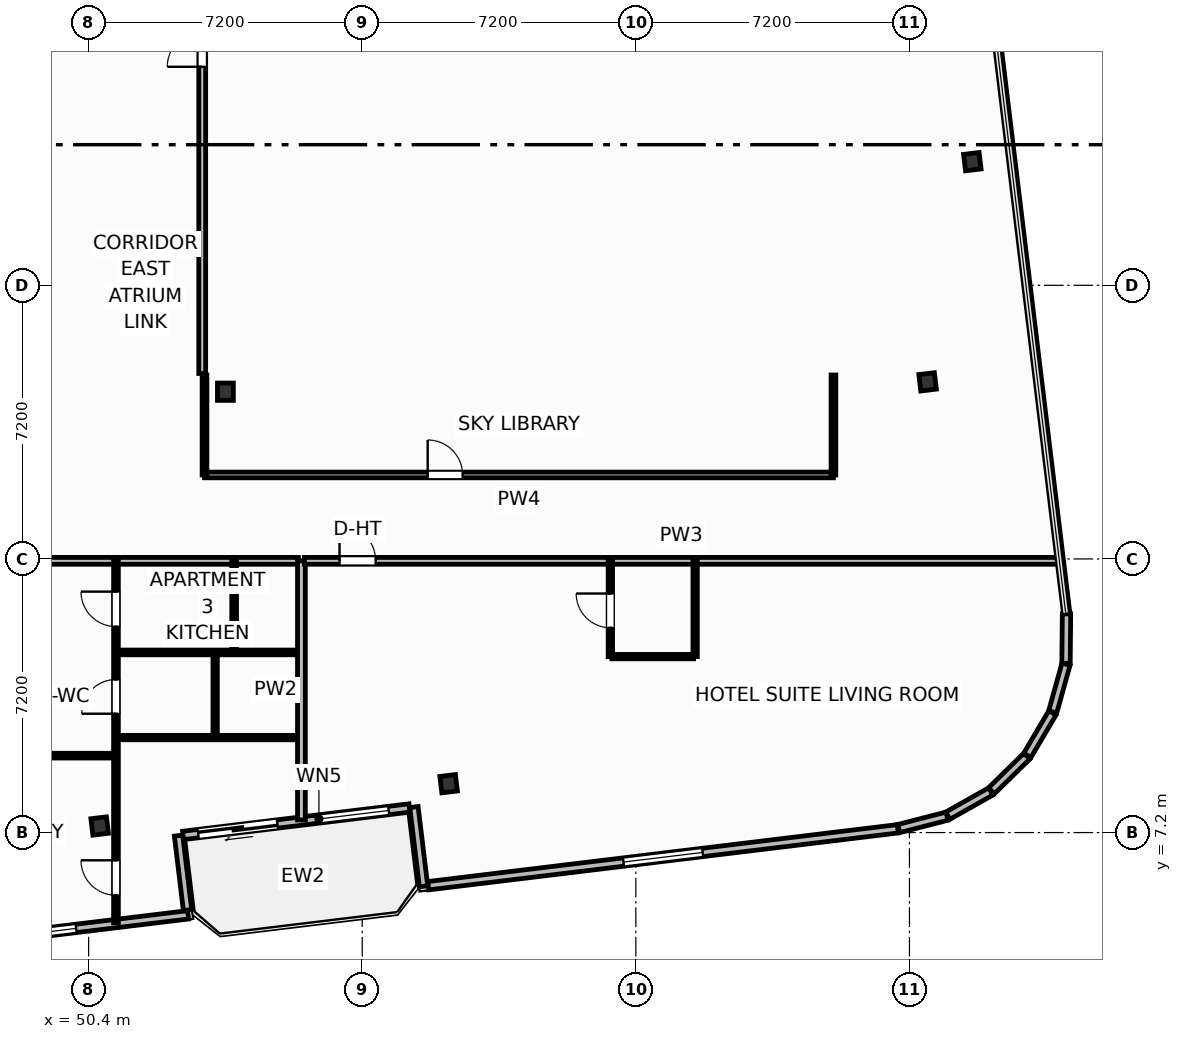
"""IFC4 building model, lengths in metres.
Left out: names, types, materials, properties, quantities, classifications, styles, units other than length and angle.
Written with IfcOpenShell. Run it as: python <this file> out.ifc"""

import sys

from ifc_helpers import new_model, si_unit, direction, frame, frame_2d, origin, origin_2d, place, context, subcontext, project, spatial, rectangle, i_section, extrude, element, fill, save


model = new_model("IFC4")
c1 = context("Model", 3, precision=1e-05, world=origin(), true_north=direction((0.0, 1.0)))
c2 = subcontext(c1, "Body", "Model", "MODEL_VIEW")
j1 = project(units=[si_unit("LENGTHUNIT", "METRE"), si_unit("PLANEANGLEUNIT", "RADIAN")], contexts=[c1])
p1 = place(None, origin())
s1 = spatial("IfcSite", under=j1, at=p1, CompositionType="ELEMENT")
p2 = place(p1, origin())
s2 = spatial("IfcBuilding", under=s1, at=p2, CompositionType="ELEMENT")
p3 = place(p2, frame((0.0, 0.0, 185.7)))
s3 = spatial("IfcBuildingStorey", under=s2, at=p3, CompositionType="ELEMENT", Elevation=185.7)
p4 = place(p3, frame((54.0, 18.8, 0.0), z_axis=(0.0, 0.0, 1.0), x_axis=(1.0, 0.0, 0.0)))
e1 = element("IfcColumn", 1, at=p4, inside=s3, PredefinedType="COLUMN", context=c2, shape_type="SweptSolid", body=[
    extrude(i_section(OverallWidth=0.418, OverallDepth=0.455, WebThickness=0.042, FlangeThickness=0.068, FilletRadius=0.025, at=origin_2d()), origin(), (0.0, 0.0, 1.0), 3.7),
])
for number, where, z_axis, x_axis in (
    (2, (50.691, 7.373, 0.0), (0.0, 0.0, 1.0), (0.993, 0.12, 0.0)),
    (3, (59.874, 8.486, 0.0), (0.0, 0.0, 1.0), (0.993, 0.12, 0.0)),
    (4, (72.477, 19.059, 0.0), (0.0, 0.0, 1.0), (0.993, 0.12, 0.0)),
    (5, (73.654, 24.853, 0.0), (0.0, 0.0, 1.0), (0.993, 0.12, 0.0)),
):
    element("IfcColumn", number, at=place(p3, frame(where, z_axis=z_axis, x_axis=x_axis)), inside=s3, PredefinedType="COLUMN", context=c2, shape_type="SweptSolid", body=[
        extrude(i_section(OverallWidth=0.412, OverallDepth=0.435, WebThickness=0.036, FlangeThickness=0.057, FilletRadius=0.025, at=origin_2d()), origin(), (0.0, 0.0, 1.0), 3.7),
    ])
p5 = place(p3, frame((58.843, 7.847, 0.0), z_axis=(0.0, 0.0, 1.0), x_axis=(-0.992729951822, -0.120362962556, 0.0)))
e6 = element("IfcWall", 6, at=p5, inside=s3, PredefinedType="SOLIDWALL", context=c2, shape_type="SweptSolid", body=[
    extrude(rectangle(XDim=6.0, YDim=0.22, at=frame_2d((3.0, 0.0))), origin(), (0.0, 0.0, 1.0), 2.73),
])
p6 = place(p5, frame((3.5, 0.0, 0.0)))
e7 = element("IfcOpeningElement", 7, at=p6, cuts=e6, PredefinedType="OPENING", context=c2, shape_type="SweptSolid", body=[
    extrude(rectangle(XDim=2.1, YDim=2.3, at=frame_2d((1.05, 1.15))), frame((0.0, 0.12, 0.0), z_axis=(0.0, -1.0, 0.0), x_axis=(1.0, 0.0, 0.0)), (0.0, 0.0, 1.0), 0.24),
])
p7 = place(p5, frame((0.55, 0.0, 0.75)))
e8 = element("IfcOpeningElement", 8, at=p7, cuts=e6, PredefinedType="OPENING", context=c2, shape_type="SweptSolid", body=[
    extrude(rectangle(XDim=1.85, YDim=1.75, at=frame_2d((0.925, 0.875))), frame((0.0, 0.12, 0.0), z_axis=(0.0, -1.0, 0.0), x_axis=(1.0, 0.0, 0.0)), (0.0, 0.0, 1.0), 0.24),
])
p8 = place(p3, frame((45.042, 4.069, 0.0), z_axis=(0.0, 0.0, 1.0), x_axis=(0.992731032022, 0.120354052946, 0.0)))
e9 = element("IfcWall", 9, at=p8, inside=s3, PredefinedType="SOLIDWALL", context=c2, shape_type="SweptSolid", body=[
    extrude(rectangle(XDim=8.035, YDim=0.22, at=frame_2d((4.018, 0.0))), origin(), (0.0, 0.0, 1.0), 2.73),
])
p9 = place(p8, frame((2.968, 0.0, 0.8)))
e10 = element("IfcOpeningElement", 10, at=p9, cuts=e9, PredefinedType="OPENING", context=c2, shape_type="SweptSolid", body=[
    extrude(rectangle(XDim=2.1, YDim=1.75, at=frame_2d((1.05, 0.875))), frame((0.0, 0.12, 0.0), z_axis=(0.0, -1.0, 0.0), x_axis=(1.0, 0.0, 0.0)), (0.0, 0.0, 1.0), 0.24),
])
p10 = place(p3, frame((53.004, 5.16, 0.0), z_axis=(0.0, 0.0, 1.0), x_axis=(-0.120397815541, 0.992725725472, 0.0)))
e11 = element("IfcWall", 11, at=p10, inside=s3, PredefinedType="SOLIDWALL", context=c2, shape_type="SweptSolid", body=[
    extrude(rectangle(XDim=1.975, YDim=0.22, at=frame_2d((0.988, 0.0))), origin(), (0.0, 0.0, 1.0), 2.73),
])
p11 = place(p3, frame((58.961, 7.872, 0.0), z_axis=(0.0, 0.0, 1.0), x_axis=(0.120327895535, -0.992734202874, 0.0)))
e12 = element("IfcWall", 12, at=p11, inside=s3, PredefinedType="SOLIDWALL", context=c2, shape_type="SweptSolid", body=[
    extrude(rectangle(XDim=2.1, YDim=0.22, at=frame_2d((1.05, 0.0))), origin(), (0.0, 0.0, 1.0), 2.73),
])
p12 = place(p3, frame((59.338, 5.802, 0.0), z_axis=(0.0, 0.0, 1.0), x_axis=(0.992731225757, 0.120352454927, 0.0)))
e13 = element("IfcWall", 13, at=p12, inside=s3, PredefinedType="SOLIDWALL", context=c2, shape_type="SweptSolid", body=[
    extrude(rectangle(XDim=12.447, YDim=0.22, at=frame_2d((6.224, 0.0))), origin(), (0.0, 0.0, 1.0), 2.73),
])
p13 = place(p12, frame((5.174, 0.0, 0.8)))
e14 = element("IfcOpeningElement", 14, at=p13, cuts=e13, PredefinedType="OPENING", context=c2, shape_type="SweptSolid", body=[
    extrude(rectangle(XDim=2.1, YDim=1.75, at=frame_2d((1.05, 0.875))), frame((0.0, 0.12, 0.0), z_axis=(0.0, -1.0, 0.0), x_axis=(1.0, 0.0, 0.0)), (0.0, 0.0, 1.0), 0.24),
])
p14 = place(p3, frame((71.719, 7.306, 0.0), z_axis=(0.0, 0.0, 1.0), x_axis=(0.968541764193, 0.248851061909, 0.0)))
e15 = element("IfcWall", 15, at=p14, inside=s3, PredefinedType="SOLIDWALL", context=c2, shape_type="SweptSolid", body=[
    extrude(rectangle(XDim=1.309, YDim=0.22, at=frame_2d((0.654, 0.0))), origin(), (0.0, 0.0, 1.0), 2.73),
])
for number, where, z_axis, x_axis in (
    (16, (73.008, 7.644, 0.0), (0.0, 0.0, 1.0), (0.871, 0.491, 0.0)),
    (17, (74.159, 8.3, 0.0), (0.0, 0.0, 1.0), (0.714, 0.7, 0.0)),
    (18, (75.101, 9.232, 0.0), (0.0, 0.0, 1.0), (0.509, 0.861, 0.0)),
    (19, (75.77, 10.376, 0.0), (0.0, 0.0, 1.0), (0.269, 0.963, 0.0)),
):
    element("IfcWall", number, at=place(p3, frame(where, z_axis=z_axis, x_axis=x_axis)), inside=s3, PredefinedType="SOLIDWALL", context=c2, shape_type="SweptSolid", body=[
        extrude(rectangle(XDim=1.301, YDim=0.22, at=frame_2d((0.65, 0.0))), origin(), (0.0, 0.0, 1.0), 2.73),
    ])
p15 = place(p3, frame((76.12, 11.654, 0.0), z_axis=(0.0, 0.0, 1.0), x_axis=(0.01032033607, 0.999946743914, 0.0)))
e20 = element("IfcWall", 20, at=p15, inside=s3, PredefinedType="SOLIDWALL", context=c2, shape_type="SweptSolid", body=[
    extrude(rectangle(XDim=1.301, YDim=0.22, at=frame_2d((0.65, 0.0))), origin(), (0.0, 0.0, 1.0), 2.73),
])
p16 = place(p3, frame((53.45, 16.61, 0.0), z_axis=(0.0, 0.0, 1.0), x_axis=(1.0, 0.0, 0.0)))
e21 = element("IfcWall", 21, at=p16, inside=s3, PredefinedType="PARTITIONING", context=c2, shape_type="SweptSolid", body=[
    extrude(rectangle(XDim=16.55, YDim=0.15, at=frame_2d((8.275, 0.0))), origin(), (0.0, 0.0, 1.0), 3.45),
])
p17 = place(p16, frame((5.873, 0.0, 0.0)))
e22 = element("IfcOpeningElement", 22, at=p17, cuts=e21, PredefinedType="OPENING", context=c2, shape_type="SweptSolid", body=[
    extrude(rectangle(XDim=0.92, YDim=2.05, at=frame_2d((0.46, 1.025))), frame((0.0, 0.085, 0.0), z_axis=(0.0, -1.0, 0.0), x_axis=(1.0, 0.0, 0.0)), (0.0, 0.0, 1.0), 0.17),
])
p18 = place(p3, frame((53.45, 16.61, 0.0), z_axis=(0.0, 0.0, 1.0), x_axis=(0.0, 1.0, 0.0)))
e23 = element("IfcWall", 23, at=p18, inside=s3, PredefinedType="PARTITIONING", context=c2, shape_type="SweptSolid", body=[
    extrude(rectangle(XDim=2.63, YDim=0.125, at=frame_2d((1.315, 0.0))), origin(), (0.0, 0.0, 1.0), 2.662),
])
p19 = place(p3, frame((70.0, 16.61, 0.0), z_axis=(0.0, 0.0, 1.0), x_axis=(0.0, 1.0, 0.0)))
e24 = element("IfcWall", 24, at=p19, inside=s3, PredefinedType="PARTITIONING", context=c2, shape_type="SweptSolid", body=[
    extrude(rectangle(XDim=2.63, YDim=0.125, at=frame_2d((1.315, 0.0))), origin(), (0.0, 0.0, 1.0), 3.45),
])
p20 = place(p3, frame((42.08, 9.224, 0.0), z_axis=(0.0, 0.0, 1.0), x_axis=(1.0, 0.0, 0.0)))
e25 = element("IfcWall", 25, at=p20, inside=s3, PredefinedType="PARTITIONING", context=c2, shape_type="SweptSolid", body=[
    extrude(rectangle(XDim=8.97, YDim=0.125, at=frame_2d((4.485, 0.0))), origin(), (0.0, 0.0, 1.0), 3.45),
])
p21 = place(p20, frame((4.037, 0.0, 0.0)))
e26 = element("IfcOpeningElement", 26, at=p21, cuts=e25, PredefinedType="OPENING", context=c2, shape_type="SweptSolid", body=[
    extrude(rectangle(XDim=0.92, YDim=2.05, at=frame_2d((0.46, 1.025))), frame((0.0, 0.073, 0.0), z_axis=(0.0, -1.0, 0.0), x_axis=(1.0, 0.0, 0.0)), (0.0, 0.0, 1.0), 0.145),
])
p22 = place(p3, frame((42.08, 14.35, 0.0), z_axis=(0.0, 0.0, 1.0), x_axis=(1.0, 0.0, 0.0)))
e27 = element("IfcWall", 27, at=p22, inside=s3, PredefinedType="PARTITIONING", context=c2, shape_type="SweptSolid", body=[
    extrude(rectangle(XDim=13.84, YDim=0.18, at=frame_2d((6.92, 0.0))), origin(), (0.0, 0.0, 1.0), 3.45),
])
p23 = place(p22, frame((3.985, 0.0, 0.0)))
e28 = element("IfcOpeningElement", 28, at=p23, cuts=e27, PredefinedType="OPENING", context=c2, shape_type="SweptSolid", body=[
    extrude(rectangle(XDim=1.0, YDim=2.2, at=frame_2d((0.5, 1.1))), frame((0.0, 0.1, 0.0), z_axis=(0.0, -1.0, 0.0), x_axis=(1.0, 0.0, 0.0)), (0.0, 0.0, 1.0), 0.2),
])
p24 = place(p3, frame((51.12, 4.826, 0.0), z_axis=(0.0, 0.0, 1.0), x_axis=(0.0, 1.0, 0.0)))
e29 = element("IfcWall", 29, at=p24, inside=s3, PredefinedType="PARTITIONING", context=c2, shape_type="SweptSolid", body=[
    extrude(rectangle(XDim=9.524, YDim=0.125, at=frame_2d((4.762, 0.0))), origin(), (0.0, 0.0, 1.0), 2.662),
])
p25 = place(p24, frame((0.725, 0.0, 0.0)))
e30 = element("IfcOpeningElement", 30, at=p25, cuts=e29, PredefinedType="OPENING", context=c2, shape_type="SweptSolid", body=[
    extrude(rectangle(XDim=0.92, YDim=2.05, at=frame_2d((0.46, 1.025))), frame((0.0, 0.073, 0.0), z_axis=(0.0, -1.0, 0.0), x_axis=(1.0, 0.0, 0.0)), (0.0, 0.0, 1.0), 0.145),
])
p26 = place(p24, frame((5.502, 0.0, 0.0)))
e31 = element("IfcOpeningElement", 31, at=p26, cuts=e29, PredefinedType="OPENING", context=c2, shape_type="SweptSolid", body=[
    extrude(rectangle(XDim=0.9, YDim=2.05, at=frame_2d((0.45, 1.025))), frame((0.0, 0.073, 0.0), z_axis=(0.0, -1.0, 0.0), x_axis=(1.0, 0.0, 0.0)), (0.0, 0.0, 1.0), 0.145),
])
p27 = place(p24, frame((7.794, 0.0, 0.0)))
e32 = element("IfcOpeningElement", 32, at=p27, cuts=e29, PredefinedType="OPENING", context=c2, shape_type="SweptSolid", body=[
    extrude(rectangle(XDim=0.92, YDim=2.05, at=frame_2d((0.46, 1.025))), frame((0.0, 0.073, 0.0), z_axis=(0.0, -1.0, 0.0), x_axis=(1.0, 0.0, 0.0)), (0.0, 0.0, 1.0), 0.145),
])
p28 = place(p3, frame((51.19, 11.94, 0.0), z_axis=(0.0, 0.0, 1.0), x_axis=(1.0, 0.0, 0.0)))
e33 = element("IfcWall", 33, at=p28, inside=s3, PredefinedType="PARTITIONING", context=c2, shape_type="SweptSolid", body=[
    extrude(rectangle(XDim=4.73, YDim=0.125, at=frame_2d((2.365, 0.0))), origin(), (0.0, 0.0, 1.0), 3.018),
])
p29 = place(p3, frame((51.19, 9.7, 0.0), z_axis=(0.0, 0.0, 1.0), x_axis=(1.0, 0.0, 0.0)))
e34 = element("IfcWall", 34, at=p29, inside=s3, PredefinedType="PARTITIONING", context=c2, shape_type="SweptSolid", body=[
    extrude(rectangle(XDim=4.73, YDim=0.115, at=frame_2d((2.365, 0.0))), origin(), (0.0, 0.0, 1.0), 3.45),
])
p30 = place(p3, frame((54.23, 11.94, 0.0), z_axis=(0.0, 0.0, 1.0), x_axis=(0.0, 1.0, 0.0)))
e35 = element("IfcWall", 35, at=p30, inside=s3, PredefinedType="PARTITIONING", context=c2, shape_type="SweptSolid", body=[
    extrude(rectangle(XDim=2.41, YDim=0.125, at=frame_2d((1.205, 0.0))), origin(), (0.0, 0.0, 1.0), 3.45),
])
p31 = place(p3, frame((53.73, 9.7, 0.0), z_axis=(0.0, 0.0, 1.0), x_axis=(0.0, 1.0, 0.0)))
e36 = element("IfcWall", 36, at=p31, inside=s3, PredefinedType="PARTITIONING", context=c2, shape_type="SweptSolid", body=[
    extrude(rectangle(XDim=2.24, YDim=0.115, at=frame_2d((1.12, 0.0))), origin(), (0.0, 0.0, 1.0), 3.45),
])
p32 = place(p3, frame((56.0, 7.533, 0.0), z_axis=(0.0, 0.0, 1.0), x_axis=(0.0, 1.0, 0.0)))
e37 = element("IfcWall", 37, at=p32, inside=s3, PredefinedType="PARTITIONING", context=c2, shape_type="SweptSolid", body=[
    extrude(rectangle(XDim=6.817, YDim=0.205, at=frame_2d((3.409, 0.0))), origin(), (0.0, 0.0, 1.0), 3.45),
])
p33 = place(p3, frame((56.08, 14.35, 0.0), z_axis=(0.0, 0.0, 1.0), x_axis=(1.0, 0.0, 0.0)))
e38 = element("IfcWall", 38, at=p33, inside=s3, PredefinedType="PARTITIONING", context=c2, shape_type="SweptSolid", body=[
    extrude(rectangle(XDim=19.825, YDim=0.18, at=frame_2d((9.912, 0.0))), origin(), (0.0, 0.0, 1.0), 3.45),
])
p34 = place(p33, frame((0.923, 0.0, 0.0)))
e39 = element("IfcOpeningElement", 39, at=p34, cuts=e38, PredefinedType="OPENING", context=c2, shape_type="SweptSolid", body=[
    extrude(rectangle(XDim=0.95, YDim=2.15, at=frame_2d((0.475, 1.075))), frame((0.0, 0.1, 0.0), z_axis=(0.0, -1.0, 0.0), x_axis=(1.0, 0.0, 0.0)), (0.0, 0.0, 1.0), 0.2),
])
p35 = place(p3, frame((64.17, 11.83, 0.0), z_axis=(0.0, 0.0, 1.0), x_axis=(1.0, 0.0, 0.0)))
e40 = element("IfcWall", 40, at=p35, inside=s3, PredefinedType="PARTITIONING", context=c2, shape_type="SweptSolid", body=[
    extrude(rectangle(XDim=2.15, YDim=0.115, at=frame_2d((1.075, 0.0))), origin(), (0.0, 0.0, 1.0), 3.45),
])
p36 = place(p3, frame((64.13, 11.83, 0.0), z_axis=(0.0, 0.0, 1.0), x_axis=(0.0, 1.0, 0.0)))
e41 = element("IfcWall", 41, at=p36, inside=s3, PredefinedType="PARTITIONING", context=c2, shape_type="SweptSolid", body=[
    extrude(rectangle(XDim=2.52, YDim=0.115, at=frame_2d((1.26, 0.0))), origin(), (0.0, 0.0, 1.0), 3.45),
])
p37 = place(p36, frame((0.76, 0.0, 0.0)))
e42 = element("IfcOpeningElement", 42, at=p37, cuts=e41, PredefinedType="OPENING", context=c2, shape_type="SweptSolid", body=[
    extrude(rectangle(XDim=0.9, YDim=2.05, at=frame_2d((0.45, 1.025))), frame((0.0, 0.067, 0.0), z_axis=(0.0, -1.0, 0.0), x_axis=(1.0, 0.0, 0.0)), (0.0, 0.0, 1.0), 0.135),
])
p38 = place(p3, frame((66.36, 11.83, 0.0), z_axis=(0.0, 0.0, 1.0), x_axis=(0.0, 1.0, 0.0)))
e43 = element("IfcWall", 43, at=p38, inside=s3, PredefinedType="PARTITIONING", context=c2, shape_type="SweptSolid", body=[
    extrude(rectangle(XDim=2.52, YDim=0.115, at=frame_2d((1.26, 0.0))), origin(), (0.0, 0.0, 1.0), 3.45),
])
p39 = place(p3, frame((53.39, 19.28, 0.0), z_axis=(0.0, 0.0, 1.0), x_axis=(0.0, 1.0, 0.0)))
e44 = element("IfcWall", 44, at=p39, inside=s3, PredefinedType="PARTITIONING", context=c2, shape_type="SweptSolid", body=[
    extrude(rectangle(XDim=20.02, YDim=0.18, at=frame_2d((10.01, 0.0))), origin(), (0.0, 0.0, 1.0), 3.45),
])
p40 = place(p39, frame((8.07, 0.0, 0.0)))
e45 = element("IfcOpeningElement", 45, at=p40, cuts=e44, PredefinedType="OPENING", context=c2, shape_type="SweptSolid", body=[
    extrude(rectangle(XDim=0.92, YDim=2.05, at=frame_2d((0.46, 1.025))), frame((0.0, 0.1, 0.0), z_axis=(0.0, -1.0, 0.0), x_axis=(1.0, 0.0, 0.0)), (0.0, 0.0, 1.0), 0.2),
])
p41 = place(p6, origin())
e46 = element("IfcDoor", 46, at=p41, inside=s3, OperationType="SLIDING_TO_LEFT", PredefinedType="DOOR", context=c2, shape_type="SweptSolid", body=[
    extrude(rectangle(XDim=2.1, YDim=2.3, at=frame_2d((1.05, 1.15))), frame((0.0, 0.025, 0.0), z_axis=(0.0, -1.0, 0.0), x_axis=(1.0, 0.0, 0.0)), (0.0, 0.0, 1.0), 0.05),
])
fill(e7, e46)
p42 = place(p7, origin())
e47 = element("IfcWindow", 47, at=p42, inside=s3, PartitioningType="SINGLE_PANEL", PredefinedType="WINDOW", context=c2, shape_type="SweptSolid", body=[
    extrude(rectangle(XDim=1.85, YDim=1.75, at=frame_2d((0.925, 0.875))), frame((0.0, 0.03, 0.0), z_axis=(0.0, -1.0, 0.0), x_axis=(1.0, 0.0, 0.0)), (0.0, 0.0, 1.0), 0.06),
])
fill(e8, e47)
p43 = place(p9, origin())
e48 = element("IfcWindow", 48, at=p43, inside=s3, PartitioningType="SINGLE_PANEL", PredefinedType="WINDOW", context=c2, shape_type="SweptSolid", body=[
    extrude(rectangle(XDim=2.1, YDim=1.75, at=frame_2d((1.05, 0.875))), frame((0.0, 0.03, 0.0), z_axis=(0.0, -1.0, 0.0), x_axis=(1.0, 0.0, 0.0)), (0.0, 0.0, 1.0), 0.06),
])
fill(e10, e48)
p44 = place(p13, origin())
e49 = element("IfcWindow", 49, at=p44, inside=s3, PartitioningType="SINGLE_PANEL", PredefinedType="WINDOW", context=c2, shape_type="SweptSolid", body=[
    extrude(rectangle(XDim=2.1, YDim=1.75, at=frame_2d((1.05, 0.875))), frame((0.0, 0.03, 0.0), z_axis=(0.0, -1.0, 0.0), x_axis=(1.0, 0.0, 0.0)), (0.0, 0.0, 1.0), 0.06),
])
fill(e14, e49)
p45 = place(p17, origin())
e50 = element("IfcDoor", 50, at=p45, inside=s3, OperationType="SINGLE_SWING_LEFT", PredefinedType="DOOR", context=c2, shape_type="SweptSolid", body=[
    extrude(rectangle(XDim=0.92, YDim=2.05, at=frame_2d((0.46, 1.025))), frame((0.0, 0.025, 0.0), z_axis=(0.0, -1.0, 0.0), x_axis=(1.0, 0.0, 0.0)), (0.0, 0.0, 1.0), 0.05),
])
fill(e22, e50)
p46 = place(p25, origin())
e51 = element("IfcDoor", 51, at=p46, inside=s3, OperationType="SINGLE_SWING_RIGHT", PredefinedType="DOOR", context=c2, shape_type="SweptSolid", body=[
    extrude(rectangle(XDim=0.92, YDim=2.05, at=frame_2d((0.46, 1.025))), frame((0.0, 0.025, 0.0), z_axis=(0.0, -1.0, 0.0), x_axis=(1.0, 0.0, 0.0)), (0.0, 0.0, 1.0), 0.05),
])
fill(e30, e51)
p47 = place(p26, origin())
e52 = element("IfcDoor", 52, at=p47, inside=s3, OperationType="SINGLE_SWING_LEFT", PredefinedType="DOOR", context=c2, shape_type="SweptSolid", body=[
    extrude(rectangle(XDim=0.9, YDim=2.05, at=frame_2d((0.45, 1.025))), frame((0.0, 0.025, 0.0), z_axis=(0.0, -1.0, 0.0), x_axis=(1.0, 0.0, 0.0)), (0.0, 0.0, 1.0), 0.05),
])
fill(e31, e52)
p48 = place(p27, origin())
e53 = element("IfcDoor", 53, at=p48, inside=s3, OperationType="SINGLE_SWING_RIGHT", PredefinedType="DOOR", context=c2, shape_type="SweptSolid", body=[
    extrude(rectangle(XDim=0.92, YDim=2.05, at=frame_2d((0.46, 1.025))), frame((0.0, 0.025, 0.0), z_axis=(0.0, -1.0, 0.0), x_axis=(1.0, 0.0, 0.0)), (0.0, 0.0, 1.0), 0.05),
])
fill(e32, e53)
p49 = place(p34, origin())
e54 = element("IfcDoor", 54, at=p49, inside=s3, OperationType="SINGLE_SWING_LEFT", PredefinedType="DOOR", context=c2, shape_type="SweptSolid", body=[
    extrude(rectangle(XDim=0.95, YDim=2.15, at=frame_2d((0.475, 1.075))), frame((0.0, 0.025, 0.0), z_axis=(0.0, -1.0, 0.0), x_axis=(1.0, 0.0, 0.0)), (0.0, 0.0, 1.0), 0.05),
])
fill(e39, e54)
p50 = place(p37, origin())
e55 = element("IfcDoor", 55, at=p50, inside=s3, OperationType="SINGLE_SWING_RIGHT", PredefinedType="DOOR", context=c2, shape_type="SweptSolid", body=[
    extrude(rectangle(XDim=0.9, YDim=2.05, at=frame_2d((0.45, 1.025))), frame((0.0, 0.025, 0.0), z_axis=(0.0, -1.0, 0.0), x_axis=(1.0, 0.0, 0.0)), (0.0, 0.0, 1.0), 0.05),
])
fill(e42, e55)
p51 = place(p40, origin())
e56 = element("IfcDoor", 56, at=p51, inside=s3, OperationType="SINGLE_SWING_LEFT", PredefinedType="DOOR", context=c2, shape_type="SweptSolid", body=[
    extrude(rectangle(XDim=0.92, YDim=2.05, at=frame_2d((0.46, 1.025))), frame((0.0, 0.025, 0.0), z_axis=(0.0, -1.0, 0.0), x_axis=(1.0, 0.0, 0.0)), (0.0, 0.0, 1.0), 0.05),
])
fill(e45, e56)
save(model, sys.argv[1])
